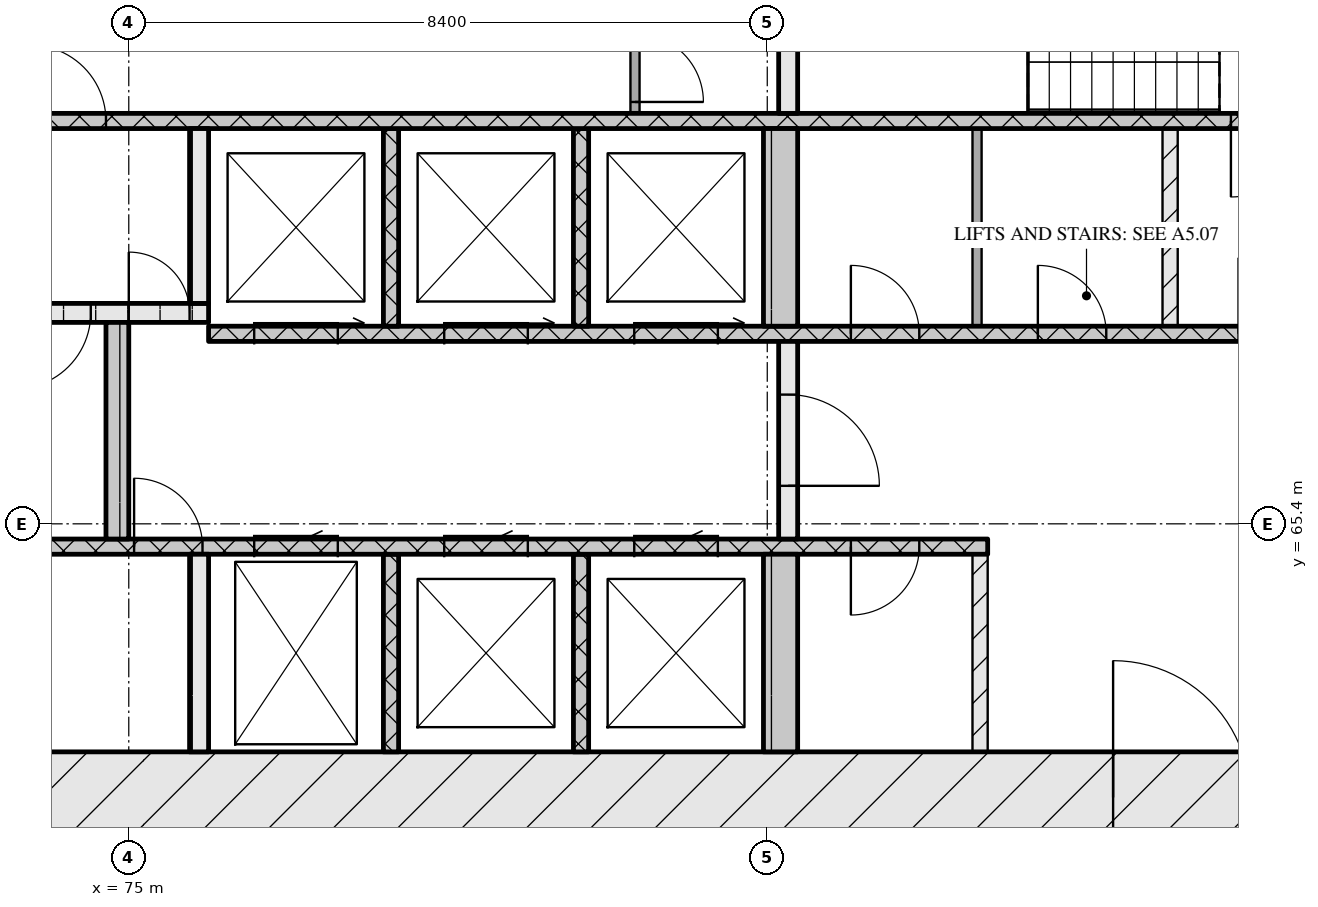
"""IFC4 building model, lengths in metres.
Left out: names, types, materials, properties, quantities, classifications, styles, units other than length and angle.
Written with IfcOpenShell. Run it as: python <this file> out.ifc"""

import sys

from ifc_helpers import new_model, si_unit, direction, frame, frame_2d, origin, place, context, subcontext, project, spatial, rectangle, extrude, element, fill, save


model = new_model("IFC4")
c1 = context("Model", 3, precision=1e-05, world=origin(), true_north=direction((0.0, 1.0)))
c2 = subcontext(c1, "Body", "Model", "MODEL_VIEW")
j1 = project(units=[si_unit("LENGTHUNIT", "METRE"), si_unit("PLANEANGLEUNIT", "RADIAN")], contexts=[c1])
p1 = place(None, origin())
s1 = spatial("IfcSite", under=j1, at=p1, CompositionType="ELEMENT")
p2 = place(p1, origin())
s2 = spatial("IfcBuilding", under=s1, at=p2, CompositionType="ELEMENT")
p3 = place(p2, frame((0.0, 0.0, 37.2)))
s3 = spatial("IfcBuildingStorey", under=s2, at=p3, CompositionType="ELEMENT", Elevation=37.2)
p4 = place(p3, frame((66.6, 61.8, 0.0), z_axis=(0.0, 0.0, 1.0), x_axis=(1.0, 0.0, 0.0)))
e1 = element("IfcWall", 1, at=p4, inside=s3, PredefinedType="SOLIDWALL", context=c2, shape_type="SweptSolid", body=[
    extrude(rectangle(XDim=42.0, YDim=1.2, at=frame_2d((21.0, 0.0))), origin(), (0.0, 0.0, 1.0), 3.32),
])
p5 = place(p4, frame((21.35, 0.0, 0.0)))
e2 = element("IfcOpeningElement", 2, at=p5, cuts=e1, PredefinedType="OPENING", context=c2, shape_type="SweptSolid", body=[
    extrude(rectangle(XDim=1.8, YDim=2.1, at=frame_2d((0.9, 1.05))), frame((0.0, 0.61, 0.0), z_axis=(0.0, -1.0, 0.0), x_axis=(1.0, 0.0, 0.0)), (0.0, 0.0, 1.0), 1.22),
])
p6 = place(p3, frame((75.925, 62.4, 0.0), z_axis=(0.0, 0.0, 1.0), x_axis=(0.0, 1.0, 0.0)))
e3 = element("IfcWall", 3, at=p6, inside=s3, PredefinedType="SOLIDWALL", context=c2, shape_type="SweptSolid", body=[
    extrude(rectangle(XDim=2.6, YDim=0.25, at=frame_2d((1.3, 0.0))), origin(), (0.0, 0.0, 1.0), 3.32),
])
for number, where, z_axis, x_axis in (
    (4, (78.45, 62.4, 0.0), (0.0, 0.0, 1.0), (0.0, 1.0, 0.0)),
    (5, (80.95, 62.4, 0.0), (0.0, 0.0, 1.0), (0.0, 1.0, 0.0)),
):
    element("IfcWall", number, at=place(p3, frame(where, z_axis=z_axis, x_axis=x_axis)), inside=s3, PredefinedType="SOLIDWALL", context=c2, shape_type="SweptSolid", body=[
        extrude(rectangle(XDim=2.6, YDim=0.2, at=frame_2d((1.3, 0.0))), origin(), (0.0, 0.0, 1.0), 3.32),
    ])
p7 = place(p3, frame((83.575, 62.4, 0.0), z_axis=(0.0, 0.0, 1.0), x_axis=(0.0, 1.0, 0.0)))
e6 = element("IfcWall", 6, at=p7, inside=s3, PredefinedType="SOLIDWALL", context=c2, shape_type="SweptSolid", body=[
    extrude(rectangle(XDim=2.6, YDim=0.45, at=frame_2d((1.3, 0.0))), origin(), (0.0, 0.0, 1.0), 3.32),
])
p8 = place(p3, frame((86.2, 62.4, 0.0), z_axis=(0.0, 0.0, 1.0), x_axis=(0.0, 1.0, 0.0)))
e7 = element("IfcWall", 7, at=p8, inside=s3, PredefinedType="PARTITIONING", context=c2, shape_type="SweptSolid", body=[
    extrude(rectangle(XDim=2.6, YDim=0.2, at=frame_2d((1.3, 0.0))), origin(), (0.0, 0.0, 1.0), 3.32),
])
p9 = place(p3, frame((67.8, 65.1, 0.0), z_axis=(0.0, 0.0, 1.0), x_axis=(1.0, 0.0, 0.0)))
e8 = element("IfcWall", 8, at=p9, inside=s3, PredefinedType="SOLIDWALL", context=c2, shape_type="SweptSolid", body=[
    extrude(rectangle(XDim=18.5, YDim=0.2, at=frame_2d((9.25, 0.0))), origin(), (0.0, 0.0, 1.0), 3.32),
])
p10 = place(p9, frame((7.27, 0.0, 0.0)))
e9 = element("IfcOpeningElement", 9, at=p10, cuts=e8, PredefinedType="OPENING", context=c2, shape_type="SweptSolid", body=[
    extrude(rectangle(XDim=0.9, YDim=2.1, at=frame_2d((0.45, 1.05))), frame((0.0, 0.11, 0.0), z_axis=(0.0, -1.0, 0.0), x_axis=(1.0, 0.0, 0.0)), (0.0, 0.0, 1.0), 0.22),
])
p11 = place(p9, frame((8.85, 0.0, 0.0)))
e10 = element("IfcOpeningElement", 10, at=p11, cuts=e8, PredefinedType="OPENING", context=c2, shape_type="SweptSolid", body=[
    extrude(rectangle(XDim=1.1, YDim=2.1, at=frame_2d((0.55, 1.05))), frame((0.0, 0.11, 0.0), z_axis=(0.0, -1.0, 0.0), x_axis=(1.0, 0.0, 0.0)), (0.0, 0.0, 1.0), 0.22),
])
p12 = place(p9, frame((11.35, 0.0, 0.0)))
e11 = element("IfcOpeningElement", 11, at=p12, cuts=e8, PredefinedType="OPENING", context=c2, shape_type="SweptSolid", body=[
    extrude(rectangle(XDim=1.1, YDim=2.1, at=frame_2d((0.55, 1.05))), frame((0.0, 0.11, 0.0), z_axis=(0.0, -1.0, 0.0), x_axis=(1.0, 0.0, 0.0)), (0.0, 0.0, 1.0), 0.22),
])
p13 = place(p9, frame((13.85, 0.0, 0.0)))
e12 = element("IfcOpeningElement", 12, at=p13, cuts=e8, PredefinedType="OPENING", context=c2, shape_type="SweptSolid", body=[
    extrude(rectangle(XDim=1.1, YDim=2.1, at=frame_2d((0.55, 1.05))), frame((0.0, 0.11, 0.0), z_axis=(0.0, -1.0, 0.0), x_axis=(1.0, 0.0, 0.0)), (0.0, 0.0, 1.0), 0.22),
])
p14 = place(p9, frame((16.7, 0.0, 0.0)))
e13 = element("IfcOpeningElement", 13, at=p14, cuts=e8, PredefinedType="OPENING", context=c2, shape_type="SweptSolid", body=[
    extrude(rectangle(XDim=0.9, YDim=2.1, at=frame_2d((0.45, 1.05))), frame((0.0, 0.11, 0.0), z_axis=(0.0, -1.0, 0.0), x_axis=(1.0, 0.0, 0.0)), (0.0, 0.0, 1.0), 0.22),
])
p15 = place(p3, frame((74.85, 65.2, 0.0), z_axis=(0.0, 0.0, 1.0), x_axis=(0.0, 1.0, 0.0)))
e14 = element("IfcWall", 14, at=p15, inside=s3, PredefinedType="SOLIDWALL", context=c2, shape_type="SweptSolid", body=[
    extrude(rectangle(XDim=2.85, YDim=0.3, at=frame_2d((1.425, 0.0))), origin(), (0.0, 0.0, 1.0), 3.32),
])
p16 = place(p3, frame((83.675, 65.2, 0.0), z_axis=(0.0, 0.0, 1.0), x_axis=(0.0, 1.0, 0.0)))
e15 = element("IfcWall", 15, at=p16, inside=s3, PredefinedType="SOLIDWALL", context=c2, shape_type="SweptSolid", body=[
    extrude(rectangle(XDim=2.6, YDim=0.25, at=frame_2d((1.3, 0.0))), origin(), (0.0, 0.0, 1.0), 3.32),
])
p17 = place(p16, frame((0.7, 0.0, 0.0)))
e16 = element("IfcOpeningElement", 16, at=p17, cuts=e15, PredefinedType="OPENING", context=c2, shape_type="SweptSolid", body=[
    extrude(rectangle(XDim=1.2, YDim=2.1, at=frame_2d((0.6, 1.05))), frame((0.0, 0.135, 0.0), z_axis=(0.0, -1.0, 0.0), x_axis=(1.0, 0.0, 0.0)), (0.0, 0.0, 1.0), 0.27),
])
p18 = place(p3, frame((76.05, 67.9, 0.0), z_axis=(0.0, 0.0, 1.0), x_axis=(1.0, 0.0, 0.0)))
e17 = element("IfcWall", 17, at=p18, inside=s3, PredefinedType="SOLIDWALL", context=c2, shape_type="SweptSolid", body=[
    extrude(rectangle(XDim=23.1, YDim=0.2, at=frame_2d((11.55, 0.0))), origin(), (0.0, 0.0, 1.0), 3.32),
])
p19 = place(p18, frame((0.6, 0.0, 0.0)))
e18 = element("IfcOpeningElement", 18, at=p19, cuts=e17, PredefinedType="OPENING", context=c2, shape_type="SweptSolid", body=[
    extrude(rectangle(XDim=1.1, YDim=2.1, at=frame_2d((0.55, 1.05))), frame((0.0, 0.11, 0.0), z_axis=(0.0, -1.0, 0.0), x_axis=(1.0, 0.0, 0.0)), (0.0, 0.0, 1.0), 0.22),
])
p20 = place(p18, frame((3.1, 0.0, 0.0)))
e19 = element("IfcOpeningElement", 19, at=p20, cuts=e17, PredefinedType="OPENING", context=c2, shape_type="SweptSolid", body=[
    extrude(rectangle(XDim=1.1, YDim=2.1, at=frame_2d((0.55, 1.05))), frame((0.0, 0.11, 0.0), z_axis=(0.0, -1.0, 0.0), x_axis=(1.0, 0.0, 0.0)), (0.0, 0.0, 1.0), 0.22),
])
p21 = place(p18, frame((5.6, 0.0, 0.0)))
e20 = element("IfcOpeningElement", 20, at=p21, cuts=e17, PredefinedType="OPENING", context=c2, shape_type="SweptSolid", body=[
    extrude(rectangle(XDim=1.1, YDim=2.1, at=frame_2d((0.55, 1.05))), frame((0.0, 0.11, 0.0), z_axis=(0.0, -1.0, 0.0), x_axis=(1.0, 0.0, 0.0)), (0.0, 0.0, 1.0), 0.22),
])
p22 = place(p18, frame((8.45, 0.0, 0.0)))
e21 = element("IfcOpeningElement", 21, at=p22, cuts=e17, PredefinedType="OPENING", context=c2, shape_type="SweptSolid", body=[
    extrude(rectangle(XDim=0.9, YDim=2.1, at=frame_2d((0.45, 1.05))), frame((0.0, 0.11, 0.0), z_axis=(0.0, -1.0, 0.0), x_axis=(1.0, 0.0, 0.0)), (0.0, 0.0, 1.0), 0.22),
])
p23 = place(p18, frame((10.91, 0.0, 0.0)))
e22 = element("IfcOpeningElement", 22, at=p23, cuts=e17, PredefinedType="OPENING", context=c2, shape_type="SweptSolid", body=[
    extrude(rectangle(XDim=0.9, YDim=2.1, at=frame_2d((0.45, 1.05))), frame((0.0, 0.11, 0.0), z_axis=(0.0, -1.0, 0.0), x_axis=(1.0, 0.0, 0.0)), (0.0, 0.0, 1.0), 0.22),
])
p24 = place(p18, frame((13.55, 0.0, 0.0)))
e23 = element("IfcOpeningElement", 23, at=p24, cuts=e17, PredefinedType="OPENING", context=c2, shape_type="SweptSolid", body=[
    extrude(rectangle(XDim=1.0, YDim=2.1, at=frame_2d((0.5, 1.05))), frame((0.0, 0.11, 0.0), z_axis=(0.0, -1.0, 0.0), x_axis=(1.0, 0.0, 0.0)), (0.0, 0.0, 1.0), 0.22),
])
for number, where, z_axis, x_axis in (
    (24, (78.45, 68.0, 0.0), (0.0, 0.0, 1.0), (0.0, 1.0, 0.0)),
    (25, (80.95, 68.0, 0.0), (0.0, 0.0, 1.0), (0.0, 1.0, 0.0)),
):
    element("IfcWall", number, at=place(p3, frame(where, z_axis=z_axis, x_axis=x_axis)), inside=s3, PredefinedType="SOLIDWALL", context=c2, shape_type="SweptSolid", body=[
        extrude(rectangle(XDim=2.6, YDim=0.2, at=frame_2d((1.3, 0.0))), origin(), (0.0, 0.0, 1.0), 3.32),
    ])
p25 = place(p3, frame((83.575, 68.0, 0.0), z_axis=(0.0, 0.0, 1.0), x_axis=(0.0, 1.0, 0.0)))
e26 = element("IfcWall", 26, at=p25, inside=s3, PredefinedType="SOLIDWALL", context=c2, shape_type="SweptSolid", body=[
    extrude(rectangle(XDim=2.6, YDim=0.45, at=frame_2d((1.3, 0.0))), origin(), (0.0, 0.0, 1.0), 3.32),
])
p26 = place(p3, frame((86.16, 68.0, 0.0), z_axis=(0.0, 0.0, 1.0), x_axis=(0.0, 1.0, 0.0)))
e27 = element("IfcWall", 27, at=p26, inside=s3, PredefinedType="PARTITIONING", context=c2, shape_type="SweptSolid", body=[
    extrude(rectangle(XDim=2.6, YDim=0.12, at=frame_2d((1.3, 0.0))), origin(), (0.0, 0.0, 1.0), 3.32),
])
p27 = place(p3, frame((88.7, 68.0, 0.0), z_axis=(0.0, 0.0, 1.0), x_axis=(0.0, 1.0, 0.0)))
e28 = element("IfcWall", 28, at=p27, inside=s3, PredefinedType="PARTITIONING", context=c2, shape_type="SweptSolid", body=[
    extrude(rectangle(XDim=2.6, YDim=0.2, at=frame_2d((1.3, 0.0))), origin(), (0.0, 0.0, 1.0), 3.32),
])
p28 = place(p3, frame((67.8, 68.175, 0.0), z_axis=(0.0, 0.0, 1.0), x_axis=(1.0, 0.0, 0.0)))
e29 = element("IfcWall", 29, at=p28, inside=s3, PredefinedType="SOLIDWALL", context=c2, shape_type="SweptSolid", body=[
    extrude(rectangle(XDim=8.25, YDim=0.25, at=frame_2d((4.125, 0.0))), origin(), (0.0, 0.0, 1.0), 3.32),
])
p29 = place(p28, frame((5.7, 0.0, 0.0)))
e30 = element("IfcOpeningElement", 30, at=p29, cuts=e29, PredefinedType="OPENING", context=c2, shape_type="SweptSolid", body=[
    extrude(rectangle(XDim=1.0, YDim=2.1, at=frame_2d((0.5, 1.05))), frame((0.0, 0.135, 0.0), z_axis=(0.0, -1.0, 0.0), x_axis=(1.0, 0.0, 0.0)), (0.0, 0.0, 1.0), 0.27),
])
p30 = place(p28, frame((7.2, 0.0, 0.0)))
e31 = element("IfcOpeningElement", 31, at=p30, cuts=e29, PredefinedType="OPENING", context=c2, shape_type="SweptSolid", body=[
    extrude(rectangle(XDim=0.8, YDim=2.1, at=frame_2d((0.4, 1.05))), frame((0.0, 0.135, 0.0), z_axis=(0.0, -1.0, 0.0), x_axis=(1.0, 0.0, 0.0)), (0.0, 0.0, 1.0), 0.27),
])
p31 = place(p3, frame((75.925, 68.3, 0.0), z_axis=(0.0, 0.0, 1.0), x_axis=(0.0, 1.0, 0.0)))
e32 = element("IfcWall", 32, at=p31, inside=s3, PredefinedType="SOLIDWALL", context=c2, shape_type="SweptSolid", body=[
    extrude(rectangle(XDim=2.3, YDim=0.25, at=frame_2d((1.15, 0.0))), origin(), (0.0, 0.0, 1.0), 3.32),
])
p32 = place(p3, frame((67.8, 70.7, 0.0), z_axis=(0.0, 0.0, 1.0), x_axis=(1.0, 0.0, 0.0)))
e33 = element("IfcWall", 33, at=p32, inside=s3, PredefinedType="SOLIDWALL", context=c2, shape_type="SweptSolid", body=[
    extrude(rectangle(XDim=39.6, YDim=0.2, at=frame_2d((19.8, 0.0))), origin(), (0.0, 0.0, 1.0), 3.32),
])
p33 = place(p32, frame((0.65, 0.0, 0.0)))
e34 = element("IfcOpeningElement", 34, at=p33, cuts=e33, PredefinedType="OPENING", context=c2, shape_type="SweptSolid", body=[
    extrude(rectangle(XDim=1.1, YDim=2.1, at=frame_2d((0.55, 1.05))), frame((0.0, 0.11, 0.0), z_axis=(0.0, -1.0, 0.0), x_axis=(1.0, 0.0, 0.0)), (0.0, 0.0, 1.0), 0.22),
])
p34 = place(p32, frame((3.25, 0.0, 0.0)))
e35 = element("IfcOpeningElement", 35, at=p34, cuts=e33, PredefinedType="OPENING", context=c2, shape_type="SweptSolid", body=[
    extrude(rectangle(XDim=1.1, YDim=2.1, at=frame_2d((0.55, 1.05))), frame((0.0, 0.11, 0.0), z_axis=(0.0, -1.0, 0.0), x_axis=(1.0, 0.0, 0.0)), (0.0, 0.0, 1.0), 0.22),
])
p35 = place(p32, frame((5.9, 0.0, 0.0)))
e36 = element("IfcOpeningElement", 36, at=p35, cuts=e33, PredefinedType="OPENING", context=c2, shape_type="SweptSolid", body=[
    extrude(rectangle(XDim=1.0, YDim=2.1, at=frame_2d((0.5, 1.05))), frame((0.0, 0.11, 0.0), z_axis=(0.0, -1.0, 0.0), x_axis=(1.0, 0.0, 0.0)), (0.0, 0.0, 1.0), 0.22),
])
p36 = place(p32, frame((21.7, 0.0, 0.0)))
e37 = element("IfcOpeningElement", 37, at=p36, cuts=e33, PredefinedType="OPENING", context=c2, shape_type="SweptSolid", body=[
    extrude(rectangle(XDim=1.0, YDim=2.1, at=frame_2d((0.5, 1.05))), frame((0.0, 0.11, 0.0), z_axis=(0.0, -1.0, 0.0), x_axis=(1.0, 0.0, 0.0)), (0.0, 0.0, 1.0), 0.22),
])
p37 = place(p32, frame((32.7, 0.0, 0.0)))
e38 = element("IfcOpeningElement", 38, at=p37, cuts=e33, PredefinedType="OPENING", context=c2, shape_type="SweptSolid", body=[
    extrude(rectangle(XDim=1.0, YDim=2.1, at=frame_2d((0.5, 1.05))), frame((0.0, 0.11, 0.0), z_axis=(0.0, -1.0, 0.0), x_axis=(1.0, 0.0, 0.0)), (0.0, 0.0, 1.0), 0.22),
])
p38 = place(p32, frame((35.25, 0.0, 0.0)))
e39 = element("IfcOpeningElement", 39, at=p38, cuts=e33, PredefinedType="OPENING", context=c2, shape_type="SweptSolid", body=[
    extrude(rectangle(XDim=1.1, YDim=2.1, at=frame_2d((0.55, 1.05))), frame((0.0, 0.11, 0.0), z_axis=(0.0, -1.0, 0.0), x_axis=(1.0, 0.0, 0.0)), (0.0, 0.0, 1.0), 0.22),
])
p39 = place(p32, frame((37.85, 0.0, 0.0)))
e40 = element("IfcOpeningElement", 40, at=p39, cuts=e33, PredefinedType="OPENING", context=c2, shape_type="SweptSolid", body=[
    extrude(rectangle(XDim=1.1, YDim=2.1, at=frame_2d((0.55, 1.05))), frame((0.0, 0.11, 0.0), z_axis=(0.0, -1.0, 0.0), x_axis=(1.0, 0.0, 0.0)), (0.0, 0.0, 1.0), 0.22),
])
p40 = place(p3, frame((81.66, 70.8, 0.0), z_axis=(0.0, 0.0, 1.0), x_axis=(0.0, 1.0, 0.0)))
e41 = element("IfcWall", 41, at=p40, inside=s3, PredefinedType="PARTITIONING", context=c2, shape_type="SweptSolid", body=[
    extrude(rectangle(XDim=1.2, YDim=0.12, at=frame_2d((0.6, 0.0))), origin(), (0.0, 0.0, 1.0), 3.32),
])
p41 = place(p40, frame((0.15, 0.0, 0.0)))
e42 = element("IfcOpeningElement", 42, at=p41, cuts=e41, PredefinedType="OPENING", context=c2, shape_type="SweptSolid", body=[
    extrude(rectangle(XDim=0.9, YDim=2.1, at=frame_2d((0.45, 1.05))), frame((0.0, 0.07, 0.0), z_axis=(0.0, -1.0, 0.0), x_axis=(1.0, 0.0, 0.0)), (0.0, 0.0, 1.0), 0.14),
])
p42 = place(p3, frame((83.675, 70.8, 0.0), z_axis=(0.0, 0.0, 1.0), x_axis=(0.0, 1.0, 0.0)))
e43 = element("IfcWall", 43, at=p42, inside=s3, PredefinedType="SOLIDWALL", context=c2, shape_type="SweptSolid", body=[
    extrude(rectangle(XDim=2.95, YDim=0.25, at=frame_2d((1.475, 0.0))), origin(), (0.0, 0.0, 1.0), 3.32),
])
p43 = place(p5, origin())
e44 = element("IfcDoor", 44, at=p43, inside=s3, OperationType="DOUBLE_DOOR_SINGLE_SWING", PredefinedType="DOOR", context=c2, shape_type="SweptSolid", body=[
    extrude(rectangle(XDim=1.8, YDim=2.1, at=frame_2d((0.9, 1.05))), frame((0.0, 0.025, 0.0), z_axis=(0.0, -1.0, 0.0), x_axis=(1.0, 0.0, 0.0)), (0.0, 0.0, 1.0), 0.05),
])
fill(e2, e44)
p44 = place(p10, origin())
e45 = element("IfcDoor", 45, at=p44, inside=s3, OperationType="SINGLE_SWING_LEFT", PredefinedType="DOOR", context=c2, shape_type="SweptSolid", body=[
    extrude(rectangle(XDim=0.9, YDim=2.1, at=frame_2d((0.45, 1.05))), frame((0.0, 0.025, 0.0), z_axis=(0.0, -1.0, 0.0), x_axis=(1.0, 0.0, 0.0)), (0.0, 0.0, 1.0), 0.05),
])
fill(e9, e45)
p45 = place(p11, origin())
e46 = element("IfcDoor", 46, at=p45, inside=s3, OperationType="SLIDING_TO_LEFT", PredefinedType="DOOR", context=c2, shape_type="SweptSolid", body=[
    extrude(rectangle(XDim=1.1, YDim=2.1, at=frame_2d((0.55, 1.05))), frame((0.0, 0.025, 0.0), z_axis=(0.0, -1.0, 0.0), x_axis=(1.0, 0.0, 0.0)), (0.0, 0.0, 1.0), 0.05),
])
fill(e10, e46)
p46 = place(p12, origin())
e47 = element("IfcDoor", 47, at=p46, inside=s3, OperationType="SLIDING_TO_LEFT", PredefinedType="DOOR", context=c2, shape_type="SweptSolid", body=[
    extrude(rectangle(XDim=1.1, YDim=2.1, at=frame_2d((0.55, 1.05))), frame((0.0, 0.025, 0.0), z_axis=(0.0, -1.0, 0.0), x_axis=(1.0, 0.0, 0.0)), (0.0, 0.0, 1.0), 0.05),
])
fill(e11, e47)
p47 = place(p13, origin())
e48 = element("IfcDoor", 48, at=p47, inside=s3, OperationType="SLIDING_TO_LEFT", PredefinedType="DOOR", context=c2, shape_type="SweptSolid", body=[
    extrude(rectangle(XDim=1.1, YDim=2.1, at=frame_2d((0.55, 1.05))), frame((0.0, 0.025, 0.0), z_axis=(0.0, -1.0, 0.0), x_axis=(1.0, 0.0, 0.0)), (0.0, 0.0, 1.0), 0.05),
])
fill(e12, e48)
p48 = place(p14, origin())
e49 = element("IfcDoor", 49, at=p48, inside=s3, OperationType="SINGLE_SWING_RIGHT", PredefinedType="DOOR", context=c2, shape_type="SweptSolid", body=[
    extrude(rectangle(XDim=0.9, YDim=2.1, at=frame_2d((0.45, 1.05))), frame((0.0, 0.025, 0.0), z_axis=(0.0, -1.0, 0.0), x_axis=(1.0, 0.0, 0.0)), (0.0, 0.0, 1.0), 0.05),
])
fill(e13, e49)
p49 = place(p17, origin())
e50 = element("IfcDoor", 50, at=p49, inside=s3, OperationType="SINGLE_SWING_RIGHT", PredefinedType="DOOR", context=c2, shape_type="SweptSolid", body=[
    extrude(rectangle(XDim=1.2, YDim=2.1, at=frame_2d((0.6, 1.05))), frame((0.0, 0.025, 0.0), z_axis=(0.0, -1.0, 0.0), x_axis=(1.0, 0.0, 0.0)), (0.0, 0.0, 1.0), 0.05),
])
fill(e16, e50)
p50 = place(p19, origin())
e51 = element("IfcDoor", 51, at=p50, inside=s3, OperationType="SLIDING_TO_RIGHT", PredefinedType="DOOR", context=c2, shape_type="SweptSolid", body=[
    extrude(rectangle(XDim=1.1, YDim=2.1, at=frame_2d((0.55, 1.05))), frame((0.0, 0.025, 0.0), z_axis=(0.0, -1.0, 0.0), x_axis=(1.0, 0.0, 0.0)), (0.0, 0.0, 1.0), 0.05),
])
fill(e18, e51)
p51 = place(p20, origin())
e52 = element("IfcDoor", 52, at=p51, inside=s3, OperationType="SLIDING_TO_RIGHT", PredefinedType="DOOR", context=c2, shape_type="SweptSolid", body=[
    extrude(rectangle(XDim=1.1, YDim=2.1, at=frame_2d((0.55, 1.05))), frame((0.0, 0.025, 0.0), z_axis=(0.0, -1.0, 0.0), x_axis=(1.0, 0.0, 0.0)), (0.0, 0.0, 1.0), 0.05),
])
fill(e19, e52)
p52 = place(p21, origin())
e53 = element("IfcDoor", 53, at=p52, inside=s3, OperationType="SLIDING_TO_RIGHT", PredefinedType="DOOR", context=c2, shape_type="SweptSolid", body=[
    extrude(rectangle(XDim=1.1, YDim=2.1, at=frame_2d((0.55, 1.05))), frame((0.0, 0.025, 0.0), z_axis=(0.0, -1.0, 0.0), x_axis=(1.0, 0.0, 0.0)), (0.0, 0.0, 1.0), 0.05),
])
fill(e20, e53)
p53 = place(p22, origin())
e54 = element("IfcDoor", 54, at=p53, inside=s3, OperationType="SINGLE_SWING_LEFT", PredefinedType="DOOR", context=c2, shape_type="SweptSolid", body=[
    extrude(rectangle(XDim=0.9, YDim=2.1, at=frame_2d((0.45, 1.05))), frame((0.0, 0.025, 0.0), z_axis=(0.0, -1.0, 0.0), x_axis=(1.0, 0.0, 0.0)), (0.0, 0.0, 1.0), 0.05),
])
fill(e21, e54)
p54 = place(p23, origin())
e55 = element("IfcDoor", 55, at=p54, inside=s3, OperationType="SINGLE_SWING_LEFT", PredefinedType="DOOR", context=c2, shape_type="SweptSolid", body=[
    extrude(rectangle(XDim=0.9, YDim=2.1, at=frame_2d((0.45, 1.05))), frame((0.0, 0.025, 0.0), z_axis=(0.0, -1.0, 0.0), x_axis=(1.0, 0.0, 0.0)), (0.0, 0.0, 1.0), 0.05),
])
fill(e22, e55)
p55 = place(p29, origin())
e56 = element("IfcDoor", 56, at=p55, inside=s3, OperationType="SINGLE_SWING_RIGHT", PredefinedType="DOOR", context=c2, shape_type="SweptSolid", body=[
    extrude(rectangle(XDim=1.0, YDim=2.1, at=frame_2d((0.5, 1.05))), frame((0.0, 0.025, 0.0), z_axis=(0.0, -1.0, 0.0), x_axis=(1.0, 0.0, 0.0)), (0.0, 0.0, 1.0), 0.05),
])
fill(e30, e56)
p56 = place(p30, origin())
e57 = element("IfcDoor", 57, at=p56, inside=s3, OperationType="SINGLE_SWING_LEFT", PredefinedType="DOOR", context=c2, shape_type="SweptSolid", body=[
    extrude(rectangle(XDim=0.8, YDim=2.1, at=frame_2d((0.4, 1.05))), frame((0.0, 0.025, 0.0), z_axis=(0.0, -1.0, 0.0), x_axis=(1.0, 0.0, 0.0)), (0.0, 0.0, 1.0), 0.05),
])
fill(e31, e57)
p57 = place(p35, origin())
e58 = element("IfcDoor", 58, at=p57, inside=s3, OperationType="SINGLE_SWING_LEFT", PredefinedType="DOOR", context=c2, shape_type="SweptSolid", body=[
    extrude(rectangle(XDim=1.0, YDim=2.1, at=frame_2d((0.5, 1.05))), frame((0.0, 0.025, 0.0), z_axis=(0.0, -1.0, 0.0), x_axis=(1.0, 0.0, 0.0)), (0.0, 0.0, 1.0), 0.05),
])
fill(e36, e58)
p58 = place(p36, origin())
e59 = element("IfcDoor", 59, at=p58, inside=s3, OperationType="SINGLE_SWING_RIGHT", PredefinedType="DOOR", context=c2, shape_type="SweptSolid", body=[
    extrude(rectangle(XDim=1.0, YDim=2.1, at=frame_2d((0.5, 1.05))), frame((0.0, 0.025, 0.0), z_axis=(0.0, -1.0, 0.0), x_axis=(1.0, 0.0, 0.0)), (0.0, 0.0, 1.0), 0.05),
])
fill(e37, e59)
p59 = place(p41, origin())
e60 = element("IfcDoor", 60, at=p59, inside=s3, OperationType="SINGLE_SWING_RIGHT", PredefinedType="DOOR", context=c2, shape_type="SweptSolid", body=[
    extrude(rectangle(XDim=0.9, YDim=2.1, at=frame_2d((0.45, 1.05))), frame((0.0, 0.025, 0.0), z_axis=(0.0, -1.0, 0.0), x_axis=(1.0, 0.0, 0.0)), (0.0, 0.0, 1.0), 0.05),
])
fill(e42, e60)
save(model, sys.argv[1])
